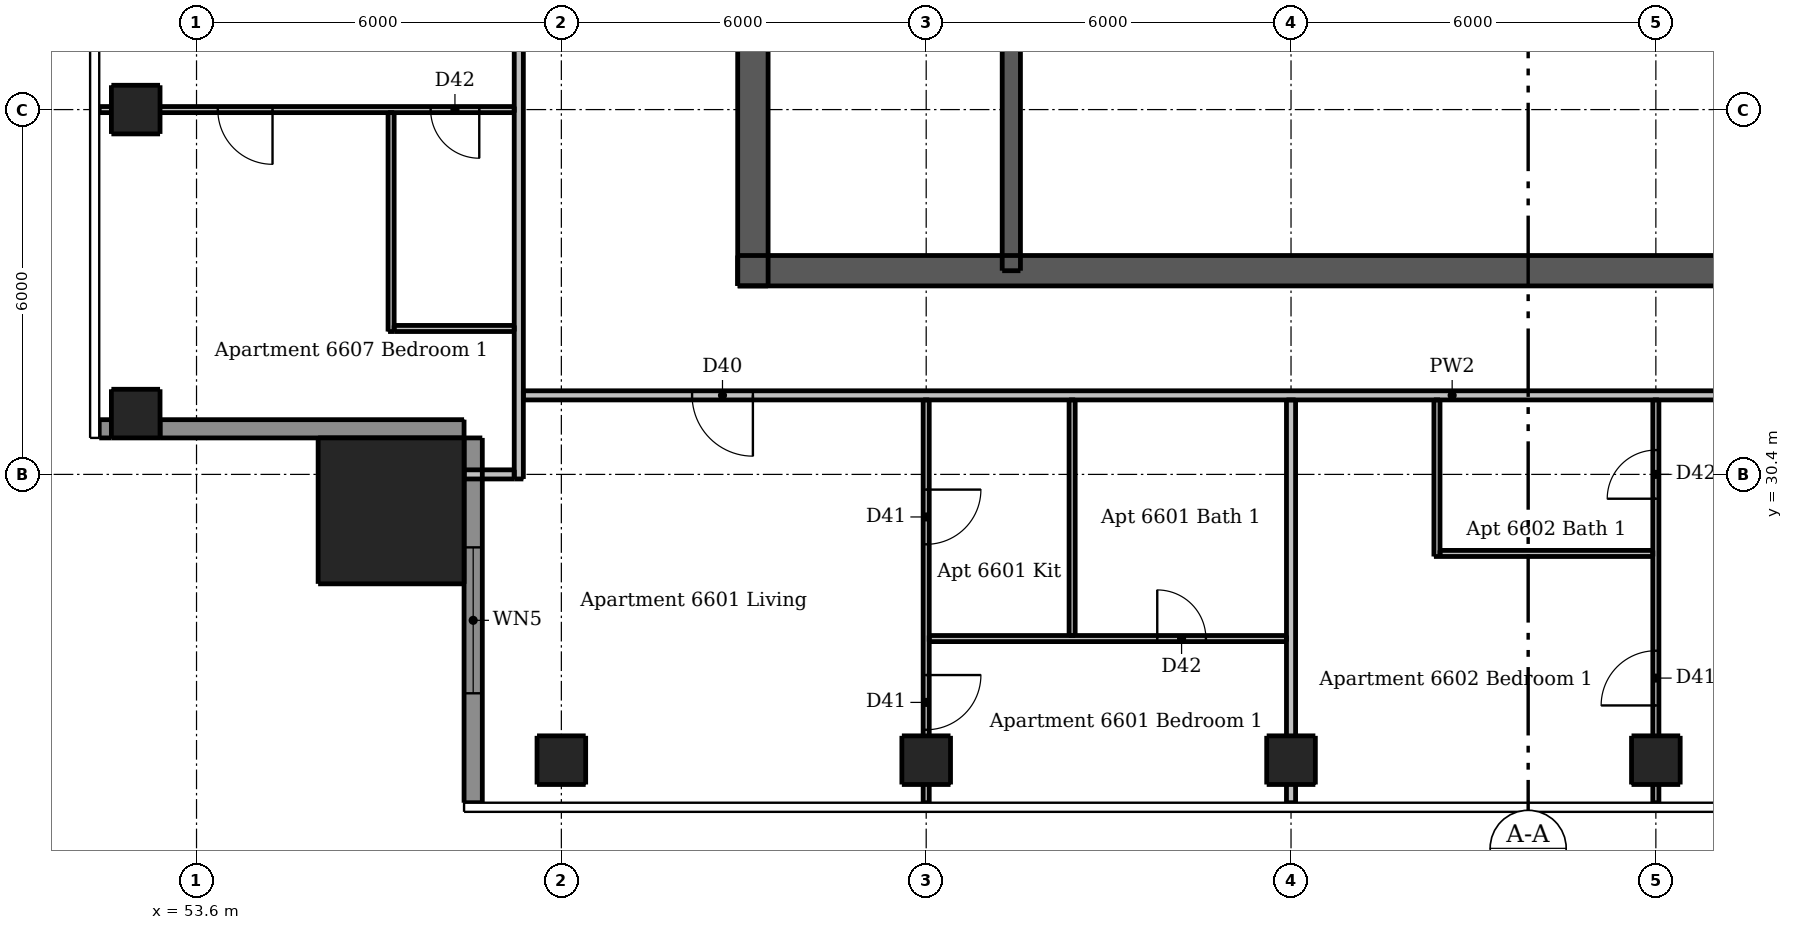
"""IFC4 building model, lengths in metres.
Left out: names, types, materials, properties, quantities, classifications, styles, units other than length and angle.
Written with IfcOpenShell. Run it as: python <this file> out.ifc"""

import sys

from ifc_helpers import new_model, si_unit, direction, frame, frame_2d, origin, origin_2d, place, context, subcontext, project, spatial, rectangle, extrude, element, fill, save


model = new_model("IFC4")
c1 = context("Model", 3, precision=1e-05, world=origin(), true_north=direction((0.0, 1.0)))
c2 = subcontext(c1, "Body", "Model", "MODEL_VIEW")
j1 = project(units=[si_unit("LENGTHUNIT", "METRE"), si_unit("PLANEANGLEUNIT", "RADIAN")], contexts=[c1])
p1 = place(None, origin())
s1 = spatial("IfcSite", under=j1, at=p1, CompositionType="ELEMENT")
p2 = place(p1, origin())
s2 = spatial("IfcBuilding", under=s1, at=p2, CompositionType="ELEMENT")
p3 = place(p2, frame((0.0, 0.0, 248.8)))
s3 = spatial("IfcBuildingStorey", under=s2, at=p3, CompositionType="ELEMENT", Elevation=248.8)
p4 = place(p3, frame((62.5, 33.75, 0.0), z_axis=(0.0, 0.0, 1.0), x_axis=(1.0, 0.0, 0.0)))
e1 = element("IfcWall", 1, at=p4, inside=s3, PredefinedType="SHEAR", context=c2, shape_type="SweptSolid", body=[
    extrude(rectangle(XDim=24.0, YDim=0.5, at=frame_2d((12.0, 0.0))), origin(), (0.0, 0.0, 1.0), 3.05),
])
p5 = place(p4, frame((1.875, 0.0, 0.0)))
e2 = element("IfcOpeningElement", 2, at=p5, cuts=e1, PredefinedType="OPENING", context=c2, shape_type="SweptSolid", body=[
    extrude(rectangle(XDim=1.1, YDim=2.1, at=frame_2d((0.55, 1.05))), frame((0.0, 0.26, 0.0), z_axis=(0.0, -1.0, 0.0), x_axis=(1.0, 0.0, 0.0)), (0.0, 0.0, 1.0), 0.52),
])
p6 = place(p4, frame((21.025, 0.0, 0.0)))
e3 = element("IfcOpeningElement", 3, at=p6, cuts=e1, PredefinedType="OPENING", context=c2, shape_type="SweptSolid", body=[
    extrude(rectangle(XDim=1.1, YDim=2.1, at=frame_2d((0.55, 1.05))), frame((0.0, 0.26, 0.0), z_axis=(0.0, -1.0, 0.0), x_axis=(1.0, 0.0, 0.0)), (0.0, 0.0, 1.0), 0.52),
])
p7 = place(p4, frame((8.0, 0.0, 0.0)))
e4 = element("IfcOpeningElement", 4, at=p7, cuts=e1, PredefinedType="OPENING", context=c2, shape_type="SweptSolid", body=[
    extrude(rectangle(XDim=1.1, YDim=2.1, at=frame_2d((0.55, 1.05))), frame((0.0, 0.26, 0.0), z_axis=(0.0, -1.0, 0.0), x_axis=(1.0, 0.0, 0.0)), (0.0, 0.0, 1.0), 0.52),
])
p8 = place(p4, frame((17.512, 0.0, 0.0)))
e5 = element("IfcOpeningElement", 5, at=p8, cuts=e1, PredefinedType="OPENING", context=c2, shape_type="SweptSolid", body=[
    extrude(rectangle(XDim=0.9, YDim=2.1, at=frame_2d((0.45, 1.05))), frame((0.0, 0.26, 0.0), z_axis=(0.0, -1.0, 0.0), x_axis=(1.0, 0.0, 0.0)), (0.0, 0.0, 1.0), 0.52),
])
p9 = place(p3, frame((62.75, 33.5, 0.0), z_axis=(0.0, 0.0, 1.0), x_axis=(0.0, 1.0, 0.0)))
e6 = element("IfcWall", 6, at=p9, inside=s3, PredefinedType="SHEAR", context=c2, shape_type="SweptSolid", body=[
    extrude(rectangle(XDim=24.0, YDim=0.5, at=frame_2d((12.0, 0.0))), origin(), (0.0, 0.0, 1.0), 3.05),
])
p10 = place(p9, frame((11.2, 0.0, 0.0)))
e7 = element("IfcOpeningElement", 7, at=p10, cuts=e6, PredefinedType="OPENING", context=c2, shape_type="SweptSolid", body=[
    extrude(rectangle(XDim=1.6, YDim=2.1, at=frame_2d((0.8, 1.05))), frame((0.0, 0.26, 0.0), z_axis=(0.0, -1.0, 0.0), x_axis=(1.0, 0.0, 0.0)), (0.0, 0.0, 1.0), 0.52),
])
p11 = place(p3, frame((67.0, 33.75, 0.0), z_axis=(0.0, 0.0, 1.0), x_axis=(0.0, 1.0, 0.0)))
e8 = element("IfcWall", 8, at=p11, inside=s3, PredefinedType="SHEAR", context=c2, shape_type="SweptSolid", body=[
    extrude(rectangle(XDim=10.15, YDim=0.3, at=frame_2d((5.075, 0.0))), origin(), (0.0, 0.0, 1.0), 3.05),
])
p12 = place(p11, frame((0.45, 0.0, 0.0)))
e9 = element("IfcOpeningElement", 9, at=p12, cuts=e8, PredefinedType="OPENING", context=c2, shape_type="SweptSolid", body=[
    extrude(rectangle(XDim=1.1, YDim=2.1, at=frame_2d((0.55, 1.05))), frame((0.0, 0.16, 0.0), z_axis=(0.0, -1.0, 0.0), x_axis=(1.0, 0.0, 0.0)), (0.0, 0.0, 1.0), 0.32),
])
for number, where, z_axis, x_axis in (
    (10, (59.6, 25.7, 0.0), (0.0, 0.0, 1.0), (1.0, 0.0, 0.0)),
    (11, (65.6, 25.7, 0.0), (0.0, 0.0, 1.0), (1.0, 0.0, 0.0)),
    (12, (71.6, 25.7, 0.0), (0.0, 0.0, 1.0), (1.0, 0.0, 0.0)),
    (13, (77.6, 25.7, 0.0), (0.0, 0.0, 1.0), (1.0, 0.0, 0.0)),
    (14, (52.6, 31.4, 0.0), (0.0, 0.0, 1.0), (1.0, 0.0, 0.0)),
    (15, (52.6, 36.4, 0.0), (0.0, 0.0, 1.0), (1.0, 0.0, 0.0)),
):
    element("IfcColumn", number, at=place(p3, frame(where, z_axis=z_axis, x_axis=x_axis)), inside=s3, PredefinedType="COLUMN", context=c2, shape_type="SweptSolid", body=[
        extrude(rectangle(XDim=0.8, YDim=0.8, at=origin_2d()), origin(), (0.0, 0.0, 1.0), 3.05),
    ])
p13 = place(p3, frame((56.8, 29.8, 0.0), z_axis=(0.0, 0.0, 1.0), x_axis=(1.0, 0.0, 0.0)))
e16 = element("IfcColumn", 16, at=p13, inside=s3, PredefinedType="COLUMN", context=c2, shape_type="SweptSolid", body=[
    extrude(rectangle(XDim=2.4, YDim=2.4, at=origin_2d()), origin(), (0.0, 0.0, 1.0), 3.3),
])
p14 = place(p3, frame((52.0, 31.15, 0.0), z_axis=(0.0, 0.0, 1.0), x_axis=(1.0, 0.0, 0.0)))
e17 = element("IfcWall", 17, at=p14, inside=s3, PredefinedType="SOLIDWALL", context=c2, shape_type="SweptSolid", body=[
    extrude(rectangle(XDim=0.2, YDim=0.3, at=frame_2d((0.1, 0.0))), origin(), (0.0, 0.0, 1.0), 3.05),
])
p15 = place(p3, frame((53.0, 31.15, 0.0), z_axis=(0.0, 0.0, 1.0), x_axis=(1.0, 0.0, 0.0)))
e18 = element("IfcWall", 18, at=p15, inside=s3, PredefinedType="SOLIDWALL", context=c2, shape_type="SweptSolid", body=[
    extrude(rectangle(XDim=5.0, YDim=0.3, at=frame_2d((2.5, 0.0))), origin(), (0.0, 0.0, 1.0), 3.05),
])
p16 = place(p3, frame((58.15, 31.0, 0.0), z_axis=(0.0, 0.0, 1.0), x_axis=(0.0, -1.0, 0.0)))
e19 = element("IfcWall", 19, at=p16, inside=s3, PredefinedType="SOLIDWALL", context=c2, shape_type="SweptSolid", body=[
    extrude(rectangle(XDim=6.0, YDim=0.3, at=frame_2d((3.0, 0.0))), origin(), (0.0, 0.0, 1.0), 3.05),
])
p17 = place(p16, frame((1.8, 0.0, 0.15)))
e20 = element("IfcOpeningElement", 20, at=p17, cuts=e19, PredefinedType="OPENING", context=c2, shape_type="SweptSolid", body=[
    extrude(rectangle(XDim=2.4, YDim=2.1, at=frame_2d((1.2, 1.05))), frame((0.0, 0.16, 0.0), z_axis=(0.0, -1.0, 0.0), x_axis=(1.0, 0.0, 0.0)), (0.0, 0.0, 1.0), 0.32),
])
p18 = place(p3, frame((56.8, 32.75, 0.0), z_axis=(0.0, 0.0, 1.0), x_axis=(0.0, 1.0, 0.0)))
e21 = element("IfcWall", 21, at=p18, inside=s3, PredefinedType="PARTITIONING", context=c2, shape_type="SweptSolid", body=[
    extrude(rectangle(XDim=3.6, YDim=0.1, at=frame_2d((1.8, 0.0))), origin(), (0.0, 0.0, 1.0), 3.05),
])
p19 = place(p3, frame((65.6, 31.625, 0.0), z_axis=(0.0, 0.0, 1.0), x_axis=(0.0, -1.0, 0.0)))
e22 = element("IfcWall", 22, at=p19, inside=s3, PredefinedType="PARTITIONING", context=c2, shape_type="SweptSolid", body=[
    extrude(rectangle(XDim=6.625, YDim=0.1, at=frame_2d((3.312, 0.0))), origin(), (0.0, 0.0, 1.0), 2.59),
])
p20 = place(p19, frame((1.475, 0.0, 0.0)))
e23 = element("IfcOpeningElement", 23, at=p20, cuts=e22, PredefinedType="OPENING", context=c2, shape_type="SweptSolid", body=[
    extrude(rectangle(XDim=0.9, YDim=2.1, at=frame_2d((0.45, 1.05))), frame((0.0, 0.06, 0.0), z_axis=(0.0, -1.0, 0.0), x_axis=(1.0, 0.0, 0.0)), (0.0, 0.0, 1.0), 0.12),
])
p21 = place(p19, frame((4.525, 0.0, 0.0)))
e24 = element("IfcOpeningElement", 24, at=p21, cuts=e22, PredefinedType="OPENING", context=c2, shape_type="SweptSolid", body=[
    extrude(rectangle(XDim=0.9, YDim=2.1, at=frame_2d((0.45, 1.05))), frame((0.0, 0.06, 0.0), z_axis=(0.0, -1.0, 0.0), x_axis=(1.0, 0.0, 0.0)), (0.0, 0.0, 1.0), 0.12),
])
p22 = place(p3, frame((68.0, 27.75, 0.0), z_axis=(0.0, 0.0, 1.0), x_axis=(0.0, 1.0, 0.0)))
e25 = element("IfcWall", 25, at=p22, inside=s3, PredefinedType="PARTITIONING", context=c2, shape_type="SweptSolid", body=[
    extrude(rectangle(XDim=3.875, YDim=0.1, at=frame_2d((1.938, 0.0))), origin(), (0.0, 0.0, 1.0), 3.05),
])
p23 = place(p3, frame((74.0, 29.05, 0.0), z_axis=(0.0, 0.0, 1.0), x_axis=(0.0, 1.0, 0.0)))
e26 = element("IfcWall", 26, at=p23, inside=s3, PredefinedType="PARTITIONING", context=c2, shape_type="SweptSolid", body=[
    extrude(rectangle(XDim=2.575, YDim=0.1, at=frame_2d((1.288, 0.0))), origin(), (0.0, 0.0, 1.0), 3.05),
])
p24 = place(p3, frame((77.6, 25.0, 0.0), z_axis=(0.0, 0.0, 1.0), x_axis=(0.0, 1.0, 0.0)))
e27 = element("IfcWall", 27, at=p24, inside=s3, PredefinedType="PARTITIONING", context=c2, shape_type="SweptSolid", body=[
    extrude(rectangle(XDim=6.625, YDim=0.1, at=frame_2d((3.312, 0.0))), origin(), (0.0, 0.0, 1.0), 2.59),
])
p25 = place(p24, frame((1.6, 0.0, 0.0)))
e28 = element("IfcOpeningElement", 28, at=p25, cuts=e27, PredefinedType="OPENING", context=c2, shape_type="SweptSolid", body=[
    extrude(rectangle(XDim=0.9, YDim=2.1, at=frame_2d((0.45, 1.05))), frame((0.0, 0.06, 0.0), z_axis=(0.0, -1.0, 0.0), x_axis=(1.0, 0.0, 0.0)), (0.0, 0.0, 1.0), 0.12),
])
p26 = place(p24, frame((5.0, 0.0, 0.0)))
e29 = element("IfcOpeningElement", 29, at=p26, cuts=e27, PredefinedType="OPENING", context=c2, shape_type="SweptSolid", body=[
    extrude(rectangle(XDim=0.8, YDim=2.1, at=frame_2d((0.4, 1.05))), frame((0.0, 0.06, 0.0), z_axis=(0.0, -1.0, 0.0), x_axis=(1.0, 0.0, 0.0)), (0.0, 0.0, 1.0), 0.12),
])
p27 = place(p3, frame((58.825, 36.4, 0.0), z_axis=(0.0, 0.0, 1.0), x_axis=(-1.0, 0.0, 0.0)))
e30 = element("IfcWall", 30, at=p27, inside=s3, PredefinedType="PARTITIONING", context=c2, shape_type="SweptSolid", body=[
    extrude(rectangle(XDim=6.825, YDim=0.1, at=frame_2d((3.413, 0.0))), origin(), (0.0, 0.0, 1.0), 2.516),
])
p28 = place(p27, frame((3.975, 0.0, 0.0)))
e31 = element("IfcOpeningElement", 31, at=p28, cuts=e30, PredefinedType="OPENING", context=c2, shape_type="SweptSolid", body=[
    extrude(rectangle(XDim=0.9, YDim=2.1, at=frame_2d((0.45, 1.05))), frame((0.0, 0.06, 0.0), z_axis=(0.0, -1.0, 0.0), x_axis=(1.0, 0.0, 0.0)), (0.0, 0.0, 1.0), 0.12),
])
p29 = place(p27, frame((0.575, 0.0, 0.0)))
e32 = element("IfcOpeningElement", 32, at=p29, cuts=e30, PredefinedType="OPENING", context=c2, shape_type="SweptSolid", body=[
    extrude(rectangle(XDim=0.8, YDim=2.1, at=frame_2d((0.4, 1.05))), frame((0.0, 0.06, 0.0), z_axis=(0.0, -1.0, 0.0), x_axis=(1.0, 0.0, 0.0)), (0.0, 0.0, 1.0), 0.12),
])
p30 = place(p3, frame((56.85, 32.8, 0.0), z_axis=(0.0, 0.0, 1.0), x_axis=(1.0, 0.0, 0.0)))
e33 = element("IfcWall", 33, at=p30, inside=s3, PredefinedType="PARTITIONING", context=c2, shape_type="SweptSolid", body=[
    extrude(rectangle(XDim=1.975, YDim=0.1, at=frame_2d((0.987, 0.0))), origin(), (0.0, 0.0, 1.0), 3.05),
])
p31 = place(p3, frame((74.05, 29.1, 0.0), z_axis=(0.0, 0.0, 1.0), x_axis=(1.0, 0.0, 0.0)))
e34 = element("IfcWall", 34, at=p31, inside=s3, PredefinedType="PARTITIONING", context=c2, shape_type="SweptSolid", body=[
    extrude(rectangle(XDim=3.5, YDim=0.1, at=frame_2d((1.75, 0.0))), origin(), (0.0, 0.0, 1.0), 3.05),
])
p32 = place(p3, frame((65.65, 27.7, 0.0), z_axis=(0.0, 0.0, 1.0), x_axis=(1.0, 0.0, 0.0)))
e35 = element("IfcWall", 35, at=p32, inside=s3, PredefinedType="PARTITIONING", context=c2, shape_type="SweptSolid", body=[
    extrude(rectangle(XDim=5.875, YDim=0.1, at=frame_2d((2.938, 0.0))), origin(), (0.0, 0.0, 1.0), 3.05),
])
p33 = place(p32, frame((3.75, 0.0, 0.0)))
e36 = element("IfcOpeningElement", 36, at=p33, cuts=e35, PredefinedType="OPENING", context=c2, shape_type="SweptSolid", body=[
    extrude(rectangle(XDim=0.8, YDim=2.1, at=frame_2d((0.4, 1.05))), frame((0.0, 0.06, 0.0), z_axis=(0.0, -1.0, 0.0), x_axis=(1.0, 0.0, 0.0)), (0.0, 0.0, 1.0), 0.12),
])
p34 = place(p3, frame((58.9, 30.325, 0.0), z_axis=(0.0, 0.0, 1.0), x_axis=(0.0, 1.0, 0.0)))
e37 = element("IfcWall", 37, at=p34, inside=s3, PredefinedType="PARTITIONING", context=c2, shape_type="SweptSolid", body=[
    extrude(rectangle(XDim=30.85, YDim=0.15, at=frame_2d((15.425, 0.0))), origin(), (0.0, 0.0, 1.0), 3.05),
])
p35 = place(p34, frame((7.375, 0.0, 0.0)))
e38 = element("IfcOpeningElement", 38, at=p35, cuts=e37, PredefinedType="OPENING", context=c2, shape_type="SweptSolid", body=[
    extrude(rectangle(XDim=1.0, YDim=2.1, at=frame_2d((0.5, 1.05))), frame((0.0, 0.085, 0.0), z_axis=(0.0, -1.0, 0.0), x_axis=(1.0, 0.0, 0.0)), (0.0, 0.0, 1.0), 0.17),
])
p36 = place(p34, frame((26.925, 0.0, 0.0)))
e39 = element("IfcOpeningElement", 39, at=p36, cuts=e37, PredefinedType="OPENING", context=c2, shape_type="SweptSolid", body=[
    extrude(rectangle(XDim=1.0, YDim=2.1, at=frame_2d((0.5, 1.05))), frame((0.0, 0.085, 0.0), z_axis=(0.0, -1.0, 0.0), x_axis=(1.0, 0.0, 0.0)), (0.0, 0.0, 1.0), 0.17),
])
p37 = place(p3, frame((71.6, 25.0, 0.0), z_axis=(0.0, 0.0, 1.0), x_axis=(0.0, 1.0, 0.0)))
e40 = element("IfcWall", 40, at=p37, inside=s3, PredefinedType="PARTITIONING", context=c2, shape_type="SweptSolid", body=[
    extrude(rectangle(XDim=6.625, YDim=0.15, at=frame_2d((3.312, 0.0))), origin(), (0.0, 0.0, 1.0), 2.59),
])
p38 = place(p3, frame((89.525, 31.7, 0.0), z_axis=(0.0, 0.0, 1.0), x_axis=(-1.0, 0.0, 0.0)))
e41 = element("IfcWall", 41, at=p38, inside=s3, PredefinedType="PARTITIONING", context=c2, shape_type="SweptSolid", body=[
    extrude(rectangle(XDim=30.55, YDim=0.15, at=frame_2d((15.275, 0.0))), origin(), (0.0, 0.0, 1.0), 3.05),
])
p39 = place(p38, frame((26.775, 0.0, 0.0)))
e42 = element("IfcOpeningElement", 42, at=p39, cuts=e41, PredefinedType="OPENING", context=c2, shape_type="SweptSolid", body=[
    extrude(rectangle(XDim=1.0, YDim=2.1, at=frame_2d((0.5, 1.05))), frame((0.0, 0.085, 0.0), z_axis=(0.0, -1.0, 0.0), x_axis=(1.0, 0.0, 0.0)), (0.0, 0.0, 1.0), 0.17),
])
p40 = place(p38, frame((6.925, 0.0, 0.0)))
e43 = element("IfcOpeningElement", 43, at=p40, cuts=e41, PredefinedType="OPENING", context=c2, shape_type="SweptSolid", body=[
    extrude(rectangle(XDim=1.0, YDim=2.1, at=frame_2d((0.5, 1.05))), frame((0.0, 0.085, 0.0), z_axis=(0.0, -1.0, 0.0), x_axis=(1.0, 0.0, 0.0)), (0.0, 0.0, 1.0), 0.17),
])
p41 = place(p3, frame((58.0, 30.4, 0.0), z_axis=(0.0, 0.0, 1.0), x_axis=(1.0, 0.0, 0.0)))
e44 = element("IfcWall", 44, at=p41, inside=s3, PredefinedType="PARTITIONING", context=c2, shape_type="SweptSolid", body=[
    extrude(rectangle(XDim=0.825, YDim=0.15, at=frame_2d((0.413, 0.0))), origin(), (0.0, 0.0, 1.0), 3.05),
])
p42 = place(p17, origin())
e45 = element("IfcWindow", 45, at=p42, inside=s3, PartitioningType="DOUBLE_PANEL_VERTICAL", PredefinedType="WINDOW", context=c2, shape_type="SweptSolid", body=[
    extrude(rectangle(XDim=2.4, YDim=2.1, at=frame_2d((1.2, 1.05))), frame((0.0, 0.03, 0.0), z_axis=(0.0, -1.0, 0.0), x_axis=(1.0, 0.0, 0.0)), (0.0, 0.0, 1.0), 0.06),
])
fill(e20, e45)
p43 = place(p5, origin())
e46 = element("IfcDoor", 46, at=p43, inside=s3, OperationType="SINGLE_SWING_LEFT", PredefinedType="DOOR", context=c2, shape_type="SweptSolid", body=[
    extrude(rectangle(XDim=1.1, YDim=2.1, at=frame_2d((0.55, 1.05))), frame((0.0, 0.237, 0.0), z_axis=(0.0, -1.0, 0.0), x_axis=(1.0, 0.0, 0.0)), (0.0, 0.0, 1.0), 0.05),
])
fill(e2, e46)
p44 = place(p7, origin())
e47 = element("IfcDoor", 47, at=p44, inside=s3, OperationType="SINGLE_SWING_LEFT", PredefinedType="DOOR", context=c2, shape_type="SweptSolid", body=[
    extrude(rectangle(XDim=1.1, YDim=2.1, at=frame_2d((0.55, 1.05))), frame((0.0, 0.237, 0.0), z_axis=(0.0, -1.0, 0.0), x_axis=(1.0, 0.0, 0.0)), (0.0, 0.0, 1.0), 0.05),
])
fill(e4, e47)
p45 = place(p12, origin())
e48 = element("IfcDoor", 48, at=p45, inside=s3, OperationType="SINGLE_SWING_RIGHT", PredefinedType="DOOR", context=c2, shape_type="SweptSolid", body=[
    extrude(rectangle(XDim=1.1, YDim=2.1, at=frame_2d((0.55, 1.05))), frame((0.0, -0.087, 0.0), z_axis=(0.0, -1.0, 0.0), x_axis=(1.0, 0.0, 0.0)), (0.0, 0.0, 1.0), 0.05),
])
fill(e9, e48)
p46 = place(p39, origin())
e49 = element("IfcDoor", 49, at=p46, inside=s3, OperationType="SINGLE_SWING_LEFT", PredefinedType="DOOR", context=c2, shape_type="SweptSolid", body=[
    extrude(rectangle(XDim=1.0, YDim=2.1, at=frame_2d((0.5, 1.05))), frame((0.0, 0.025, 0.0), z_axis=(0.0, -1.0, 0.0), x_axis=(1.0, 0.0, 0.0)), (0.0, 0.0, 1.0), 0.05),
])
fill(e42, e49)
p47 = place(p20, origin())
e50 = element("IfcDoor", 50, at=p47, inside=s3, OperationType="SINGLE_SWING_LEFT", PredefinedType="DOOR", context=c2, shape_type="SweptSolid", body=[
    extrude(rectangle(XDim=0.9, YDim=2.1, at=frame_2d((0.45, 1.05))), frame((0.0, 0.025, 0.0), z_axis=(0.0, -1.0, 0.0), x_axis=(1.0, 0.0, 0.0)), (0.0, 0.0, 1.0), 0.05),
])
fill(e23, e50)
p48 = place(p21, origin())
e51 = element("IfcDoor", 51, at=p48, inside=s3, OperationType="SINGLE_SWING_LEFT", PredefinedType="DOOR", context=c2, shape_type="SweptSolid", body=[
    extrude(rectangle(XDim=0.9, YDim=2.1, at=frame_2d((0.45, 1.05))), frame((0.0, 0.025, 0.0), z_axis=(0.0, -1.0, 0.0), x_axis=(1.0, 0.0, 0.0)), (0.0, 0.0, 1.0), 0.05),
])
fill(e24, e51)
p49 = place(p33, origin())
e52 = element("IfcDoor", 52, at=p49, inside=s3, OperationType="SINGLE_SWING_LEFT", PredefinedType="DOOR", context=c2, shape_type="SweptSolid", body=[
    extrude(rectangle(XDim=0.8, YDim=2.1, at=frame_2d((0.4, 1.05))), frame((0.0, 0.025, 0.0), z_axis=(0.0, -1.0, 0.0), x_axis=(1.0, 0.0, 0.0)), (0.0, 0.0, 1.0), 0.05),
])
fill(e36, e52)
p50 = place(p25, origin())
e53 = element("IfcDoor", 53, at=p50, inside=s3, OperationType="SINGLE_SWING_LEFT", PredefinedType="DOOR", context=c2, shape_type="SweptSolid", body=[
    extrude(rectangle(XDim=0.9, YDim=2.1, at=frame_2d((0.45, 1.05))), frame((0.0, 0.025, 0.0), z_axis=(0.0, -1.0, 0.0), x_axis=(1.0, 0.0, 0.0)), (0.0, 0.0, 1.0), 0.05),
])
fill(e28, e53)
p51 = place(p26, origin())
e54 = element("IfcDoor", 54, at=p51, inside=s3, OperationType="SINGLE_SWING_LEFT", PredefinedType="DOOR", context=c2, shape_type="SweptSolid", body=[
    extrude(rectangle(XDim=0.8, YDim=2.1, at=frame_2d((0.4, 1.05))), frame((0.0, 0.025, 0.0), z_axis=(0.0, -1.0, 0.0), x_axis=(1.0, 0.0, 0.0)), (0.0, 0.0, 1.0), 0.05),
])
fill(e29, e54)
p52 = place(p28, origin())
e55 = element("IfcDoor", 55, at=p52, inside=s3, OperationType="SINGLE_SWING_LEFT", PredefinedType="DOOR", context=c2, shape_type="SweptSolid", body=[
    extrude(rectangle(XDim=0.9, YDim=2.1, at=frame_2d((0.45, 1.05))), frame((0.0, 0.025, 0.0), z_axis=(0.0, -1.0, 0.0), x_axis=(1.0, 0.0, 0.0)), (0.0, 0.0, 1.0), 0.05),
])
fill(e31, e55)
p53 = place(p29, origin())
e56 = element("IfcDoor", 56, at=p53, inside=s3, OperationType="SINGLE_SWING_LEFT", PredefinedType="DOOR", context=c2, shape_type="SweptSolid", body=[
    extrude(rectangle(XDim=0.8, YDim=2.1, at=frame_2d((0.4, 1.05))), frame((0.0, 0.025, 0.0), z_axis=(0.0, -1.0, 0.0), x_axis=(1.0, 0.0, 0.0)), (0.0, 0.0, 1.0), 0.05),
])
fill(e32, e56)
save(model, sys.argv[1])
